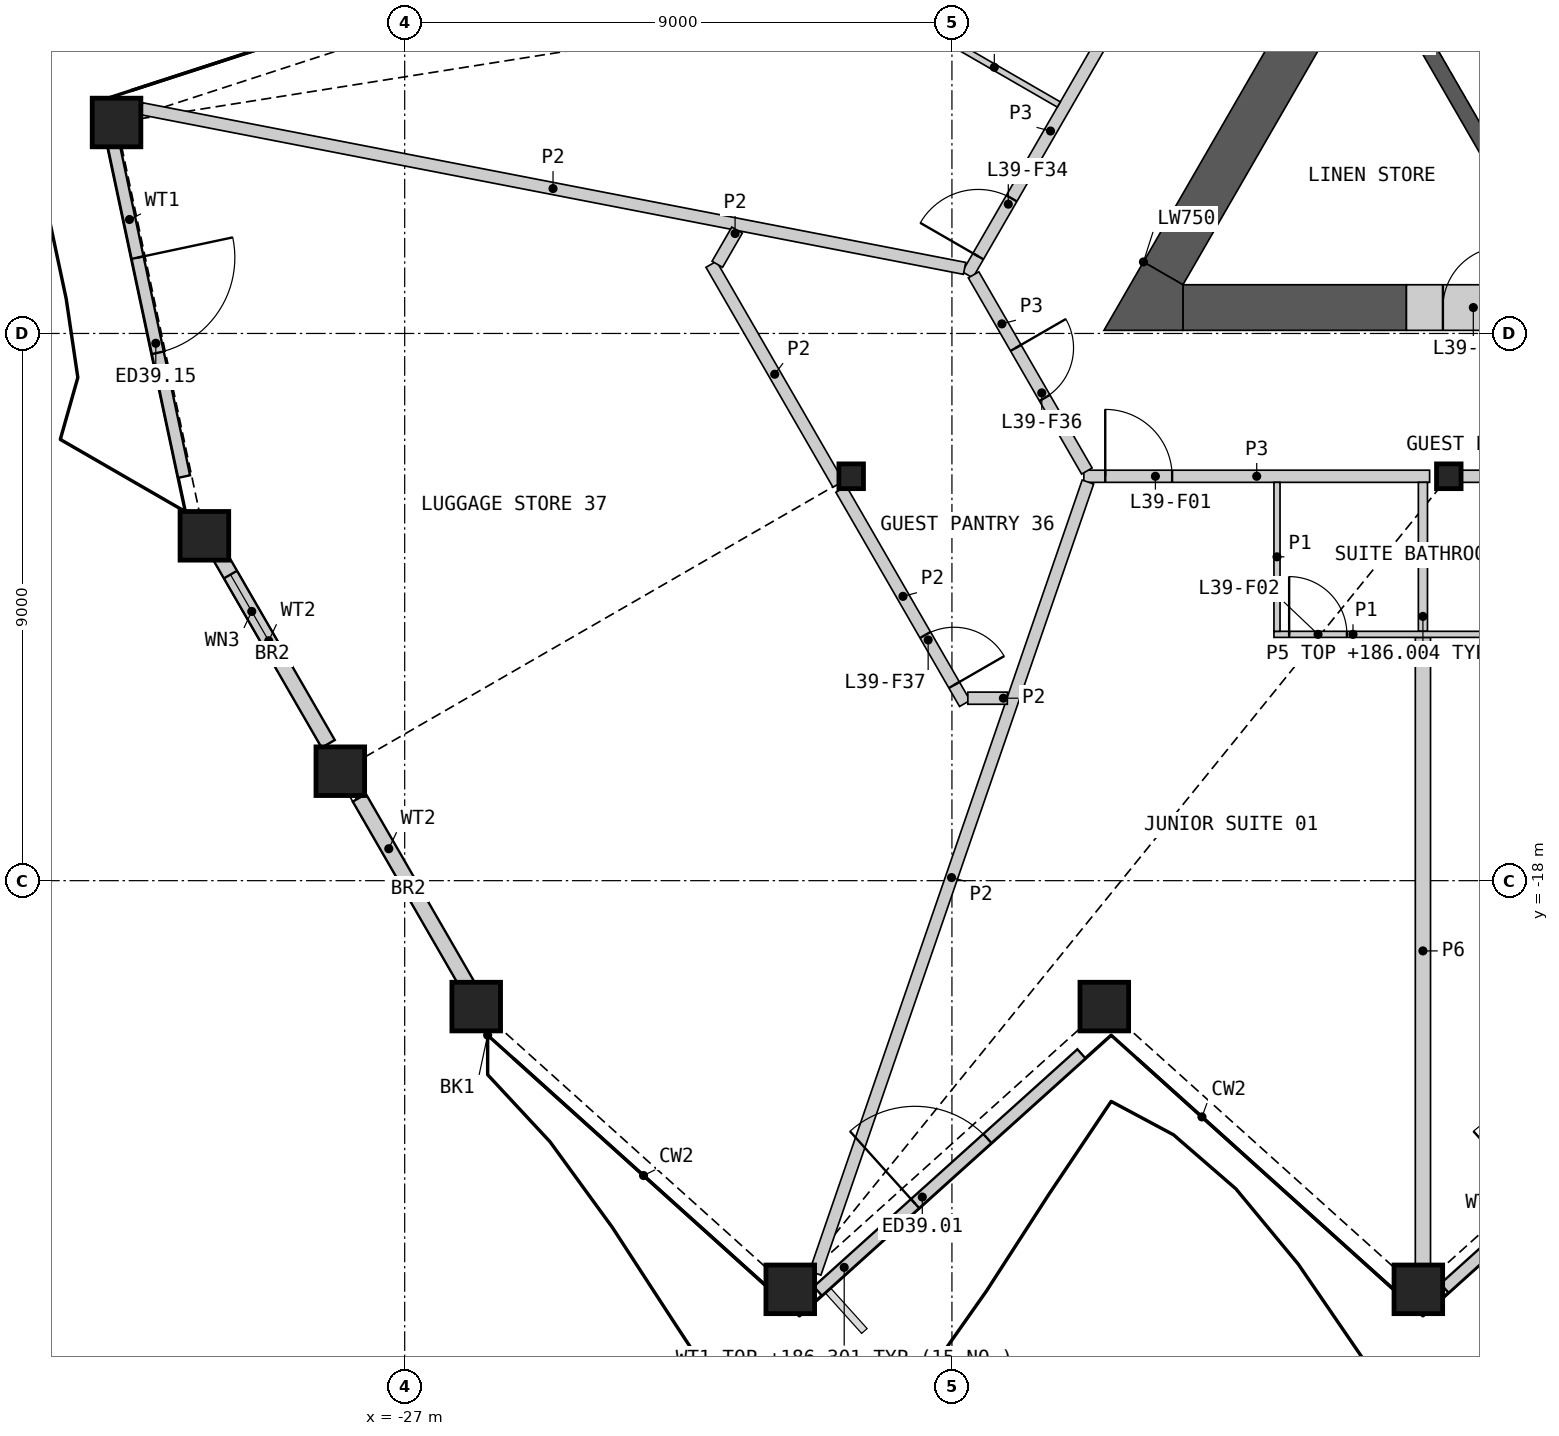
"""IFC4 building model, lengths in metres.
Left out: names, types, materials, properties, quantities, classifications, styles, units other than length and angle.
Written with IfcOpenShell. Run it as: python <this file> out.ifc"""

import sys

from ifc_helpers import new_model, si_unit, direction, frame, frame_2d, origin, origin_2d, place, context, subcontext, project, spatial, polyline, rectangle, hollow_rectangle, i_section, outline, extrude, element, fill, save


model = new_model("IFC4")
c1 = context("Model", 3, precision=1e-05, world=origin(), true_north=direction((0.0, 1.0)))
c2 = subcontext(c1, "Body", "Model", "MODEL_VIEW")
j1 = project(units=[si_unit("LENGTHUNIT", "METRE"), si_unit("PLANEANGLEUNIT", "RADIAN")], contexts=[c1])
p1 = place(None, origin())
s1 = spatial("IfcSite", under=j1, at=p1, CompositionType="ELEMENT")
p2 = place(p1, origin())
s2 = spatial("IfcBuilding", under=s1, at=p2, CompositionType="ELEMENT")
p3 = place(p2, frame((0.0, 0.0, 183.6)))
s3 = spatial("IfcBuildingStorey", under=s2, at=p3, CompositionType="ELEMENT", Elevation=183.6)
for number, where, z_axis, x_axis in (
    (1, (-25.823, -20.071, 0.0), (0.0, 0.0, 1.0), (1.0, 0.0, 0.0)),
    (2, (-20.659, -24.722, 0.0), (0.0, 0.0, 1.0), (1.0, 0.0, 0.0)),
    (3, (-15.494, -20.071, 0.0), (0.0, 0.0, 1.0), (1.0, 0.0, 0.0)),
    (4, (-10.329, -24.722, 0.0), (0.0, 0.0, 1.0), (1.0, 0.0, 0.0)),
    (5, (-31.739, -5.53, 0.0), (0.0, 0.0, 1.0), (1.0, 0.0, 0.0)),
    (6, (-30.294, -12.328, 0.0), (0.0, 0.0, 1.0), (1.0, 0.0, 0.0)),
    (7, (-28.059, -16.2, 0.0), (0.0, 0.0, 1.0), (1.0, 0.0, 0.0)),
):
    element("IfcColumn", number, at=place(p3, frame(where, z_axis=z_axis, x_axis=x_axis)), inside=s3, PredefinedType="COLUMN", context=c2, shape_type="SweptSolid", body=[
        extrude(hollow_rectangle(XDim=0.8, YDim=0.8, WallThickness=0.05, at=origin_2d()), origin(), (0.0, 0.0, 1.0), 3.6),
    ])
for number, where, z_axis, x_axis in (
    (8, (-19.657, -11.349, 0.0), (0.0, 0.0, 1.0), (1.0, 0.0, 0.0)),
    (9, (-9.828, -11.349, 0.0), (0.0, 0.0, 1.0), (1.0, 0.0, 0.0)),
):
    element("IfcColumn", number, at=place(p3, frame(where, z_axis=z_axis, x_axis=x_axis)), inside=s3, PredefinedType="COLUMN", context=c2, shape_type="SweptSolid", body=[
        extrude(i_section(OverallWidth=0.404, OverallDepth=0.407, WebThickness=0.027, FlangeThickness=0.044, at=origin_2d()), origin(), (0.0, 0.0, 1.0), 3.6),
    ])
p4 = place(p3, frame((-20.205, -24.751, 0.0), z_axis=(0.0, 0.0, 1.0), x_axis=(0.743135964011, 0.669140447883, 0.0)))
e10 = element("IfcWall", 10, at=p4, inside=s3, PredefinedType="SOLIDWALL", context=c2, shape_type="SweptSolid", body=[
    extrude(rectangle(XDim=5.833, YDim=0.2, at=frame_2d((2.917, 0.0))), origin(), (0.0, 0.0, 1.0), 2.701),
])
p5 = place(p4, frame((2.152, 0.0, 0.0)))
e11 = element("IfcOpeningElement", 11, at=p5, cuts=e10, PredefinedType="OPENING", context=c2, shape_type="SweptSolid", body=[
    extrude(rectangle(XDim=1.6, YDim=2.4, at=frame_2d((0.8, 1.2))), frame((0.0, 0.11, 0.0), z_axis=(0.0, -1.0, 0.0), x_axis=(1.0, 0.0, 0.0)), (0.0, 0.0, 1.0), 0.22),
])
p6 = place(p3, frame((-9.899, -24.704, 0.0), z_axis=(0.0, 0.0, 1.0), x_axis=(0.74312139518, 0.669156627424, 0.0)))
e12 = element("IfcWall", 12, at=p6, inside=s3, PredefinedType="SOLIDWALL", context=c2, shape_type="SweptSolid", body=[
    extrude(rectangle(XDim=5.763, YDim=0.2, at=frame_2d((2.882, 0.0))), origin(), (0.0, 0.0, 1.0), 2.701),
])
p7 = place(p6, frame((2.082, 0.0, 0.0)))
e13 = element("IfcOpeningElement", 13, at=p7, cuts=e12, PredefinedType="OPENING", context=c2, shape_type="SweptSolid", body=[
    extrude(rectangle(XDim=1.6, YDim=2.4, at=frame_2d((0.8, 1.2))), frame((0.0, 0.11, 0.0), z_axis=(0.0, -1.0, 0.0), x_axis=(1.0, 0.0, 0.0)), (0.0, 0.0, 1.0), 0.22),
])
p8 = place(p3, frame((-31.826, -5.717, 0.0), z_axis=(0.0, 0.0, 1.0), x_axis=(0.207914487103, -0.978147006361, 0.0)))
e14 = element("IfcWall", 14, at=p8, inside=s3, PredefinedType="SOLIDWALL", context=c2, shape_type="SweptSolid", body=[
    extrude(rectangle(XDim=5.763, YDim=0.2, at=frame_2d((2.882, 0.0))), origin(), (0.0, 0.0, 1.0), 2.701),
])
p9 = place(p8, frame((2.082, 0.0, 0.0)))
e15 = element("IfcOpeningElement", 15, at=p9, cuts=e14, PredefinedType="OPENING", context=c2, shape_type="SweptSolid", body=[
    extrude(rectangle(XDim=1.6, YDim=2.4, at=frame_2d((0.8, 1.2))), frame((0.0, 0.11, 0.0), z_axis=(0.0, -1.0, 0.0), x_axis=(1.0, 0.0, 0.0)), (0.0, 0.0, 1.0), 0.22),
])
p10 = place(p3, frame((-30.215, -12.36, 0.0), z_axis=(0.0, 0.0, 1.0), x_axis=(0.499995984904, -0.866027721889, 0.0)))
e16 = element("IfcWall", 16, at=p10, inside=s3, PredefinedType="SOLIDWALL", context=c2, shape_type="SweptSolid", body=[
    extrude(rectangle(XDim=3.915, YDim=0.25, at=frame_2d((1.957, 0.0))), origin(), (0.0, 0.0, 1.0), 2.701),
])
p11 = place(p10, frame((0.7, 0.0, 1.7)))
e17 = element("IfcOpeningElement", 17, at=p11, cuts=e16, PredefinedType="OPENING", context=c2, shape_type="SweptSolid", body=[
    extrude(rectangle(XDim=1.4, YDim=0.8, at=frame_2d((0.7, 0.4))), frame((0.0, 0.135, 0.0), z_axis=(0.0, -1.0, 0.0), x_axis=(1.0, 0.0, 0.0)), (0.0, 0.0, 1.0), 0.27),
])
p12 = place(p3, frame((-27.745, -16.637, 0.0), z_axis=(0.0, 0.0, 1.0), x_axis=(0.499981047344, -0.866036345829, 0.0)))
e18 = element("IfcWall", 18, at=p12, inside=s3, PredefinedType="SOLIDWALL", context=c2, shape_type="SweptSolid", body=[
    extrude(rectangle(XDim=3.868, YDim=0.25, at=frame_2d((1.934, 0.0))), origin(), (0.0, 0.0, 1.0), 2.701),
])
p13 = place(p3, origin())
e19 = element("IfcWall", 19, at=p13, inside=s3, PredefinedType="SHEAR", context=c2, shape_type="SweptSolid", body=[
    extrude(outline(polyline([(-10.374, -4.206), (-8.83, -6.881), (-8.738, -6.539), (-10.032, -4.298), (-10.374, -4.206)])), origin(), (0.0, 0.0, 1.0), 3.25),
])
p14 = place(p3, frame((-14.201, -8.574, 0.0), z_axis=(0.0, 0.0, 1.0), x_axis=(1.0, 0.0, 0.0)))
e20 = element("IfcWall", 20, at=p14, inside=s3, PredefinedType="SHEAR", context=c2, shape_type="SweptSolid", body=[
    extrude(rectangle(XDim=3.676, YDim=0.75, at=frame_2d((1.838, 0.0))), origin(), (0.0, 0.0, 1.0), 3.25),
])
p15 = place(p3, frame((-9.625, 0.477, 0.0), z_axis=(0.0, 0.0, 1.0), x_axis=(-0.499986234705, -0.866033351035, 0.0)))
e21 = element("IfcWall", 21, at=p15, inside=s3, PredefinedType="SHEAR", context=c2, shape_type="SweptSolid", body=[
    extrude(rectangle(XDim=9.801, YDim=0.75, at=frame_2d((4.9, 0.0))), origin(), (0.0, 0.0, 1.0), 3.25),
])
p16 = place(p3, origin())
e22 = element("IfcWall", 22, at=p16, inside=s3, PredefinedType="SHEAR", context=c2, shape_type="SweptSolid", body=[
    extrude(outline(polyline([(-14.851, -7.824), (-14.201, -8.199), (-14.201, -8.949), (-15.5, -8.949), (-14.851, -7.824)])), origin(), (0.0, 0.0, 1.0), 3.25),
])
p17 = place(p3, frame((-10.525, -8.574, 0.0), z_axis=(0.0, 0.0, 1.0), x_axis=(1.0, 0.0, 0.0)))
e23 = element("IfcWall", 23, at=p17, inside=s3, PredefinedType="SHEAR", context=c2, shape_type="SweptSolid", body=[
    extrude(rectangle(XDim=2.2, YDim=0.75, at=frame_2d((1.1, 0.0))), origin(), (0.0, 0.0, 1.0), 3.25),
])
p18 = place(p17, frame((0.6, 0.0, 0.0)))
e24 = element("IfcOpeningElement", 24, at=p18, cuts=e23, PredefinedType="OPENING", context=c2, shape_type="SweptSolid", body=[
    extrude(rectangle(XDim=1.0, YDim=2.1, at=frame_2d((0.5, 1.05))), frame((0.0, 0.385, 0.0), z_axis=(0.0, -1.0, 0.0), x_axis=(1.0, 0.0, 0.0)), (0.0, 0.0, 1.0), 0.77),
])
p19 = place(p3, frame((-10.254, -24.312, 0.0), z_axis=(0.0, 0.0, 1.0), x_axis=(0.0, 1.0, 0.0)))
e25 = element("IfcWall", 25, at=p19, inside=s3, PredefinedType="PARTITIONING", context=c2, shape_type="SweptSolid", body=[
    extrude(rectangle(XDim=10.313, YDim=0.25, at=frame_2d((5.156, 0.0))), origin(), (0.0, 0.0, 1.0), 2.404),
])
p20 = place(p3, frame((-9.615, -11.349, 0.0), z_axis=(0.0, 0.0, 1.0), x_axis=(1.0, 0.0, 0.0)))
e26 = element("IfcWall", 26, at=p20, inside=s3, PredefinedType="PARTITIONING", context=c2, shape_type="SweptSolid", body=[
    extrude(rectangle(XDim=9.401, YDim=0.2, at=frame_2d((4.701, 0.0))), origin(), (0.0, 0.0, 1.0), 3.25),
])
p21 = place(p20, frame((3.15, 0.0, 0.0)))
e27 = element("IfcOpeningElement", 27, at=p21, cuts=e26, PredefinedType="OPENING", context=c2, shape_type="SweptSolid", body=[
    extrude(rectangle(XDim=1.0, YDim=2.1, at=frame_2d((0.5, 1.05))), frame((0.0, 0.11, 0.0), z_axis=(0.0, -1.0, 0.0), x_axis=(1.0, 0.0, 0.0)), (0.0, 0.0, 1.0), 0.22),
])
p22 = place(p20, frame((4.851, 0.0, 0.0)))
e28 = element("IfcOpeningElement", 28, at=p22, cuts=e26, PredefinedType="OPENING", context=c2, shape_type="SweptSolid", body=[
    extrude(rectangle(XDim=1.0, YDim=2.1, at=frame_2d((0.5, 1.05))), frame((0.0, 0.11, 0.0), z_axis=(0.0, -1.0, 0.0), x_axis=(1.0, 0.0, 0.0)), (0.0, 0.0, 1.0), 0.22),
])
p23 = place(p3, frame((-15.831, -11.349, 0.0), z_axis=(0.0, 0.0, 1.0), x_axis=(1.0, 0.0, 0.0)))
e29 = element("IfcWall", 29, at=p23, inside=s3, PredefinedType="PARTITIONING", context=c2, shape_type="SweptSolid", body=[
    extrude(rectangle(XDim=5.687, YDim=0.2, at=frame_2d((2.843, 0.0))), origin(), (0.0, 0.0, 1.0), 3.25),
])
p24 = place(p23, frame((0.352, 0.0, 0.0)))
e30 = element("IfcOpeningElement", 30, at=p24, cuts=e29, PredefinedType="OPENING", context=c2, shape_type="SweptSolid", body=[
    extrude(rectangle(XDim=1.1, YDim=2.1, at=frame_2d((0.55, 1.05))), frame((0.0, 0.11, 0.0), z_axis=(0.0, -1.0, 0.0), x_axis=(1.0, 0.0, 0.0)), (0.0, 0.0, 1.0), 0.22),
])
p25 = place(p3, frame((-17.744, -8.035, 0.0), z_axis=(0.0, 0.0, 1.0), x_axis=(0.49998041698, 0.866036709751, 0.0)))
e31 = element("IfcWall", 31, at=p25, inside=s3, PredefinedType="PARTITIONING", context=c2, shape_type="SweptSolid", body=[
    extrude(rectangle(XDim=5.462, YDim=0.2, at=frame_2d((2.731, 0.0))), origin(), (0.0, 0.0, 1.0), 3.25),
])
p26 = place(p25, frame((0.352, 0.0, 0.0)))
e32 = element("IfcOpeningElement", 32, at=p26, cuts=e31, PredefinedType="OPENING", context=c2, shape_type="SweptSolid", body=[
    extrude(rectangle(XDim=1.1, YDim=2.1, at=frame_2d((0.55, 1.05))), frame((0.0, 0.11, 0.0), z_axis=(0.0, -1.0, 0.0), x_axis=(1.0, 0.0, 0.0)), (0.0, 0.0, 1.0), 0.22),
])
p27 = place(p3, frame((-17.644, -8.035, 0.0), z_axis=(0.0, 0.0, 1.0), x_axis=(0.499958791762, -0.866049194065, 0.0)))
e33 = element("IfcWall", 33, at=p27, inside=s3, PredefinedType="PARTITIONING", context=c2, shape_type="SweptSolid", body=[
    extrude(rectangle(XDim=3.726, YDim=0.2, at=frame_2d((1.863, 0.0))), origin(), (0.0, 0.0, 1.0), 3.25),
])
p28 = place(p27, frame((1.388, 0.0, 0.0)))
e34 = element("IfcOpeningElement", 34, at=p28, cuts=e33, PredefinedType="OPENING", context=c2, shape_type="SweptSolid", body=[
    extrude(rectangle(XDim=0.95, YDim=2.1, at=frame_2d((0.475, 1.05))), frame((0.0, 0.11, 0.0), z_axis=(0.0, -1.0, 0.0), x_axis=(1.0, 0.0, 0.0)), (0.0, 0.0, 1.0), 0.22),
])
p29 = place(p3, frame((-31.329, -5.303, 0.0), z_axis=(0.0, 0.0, 1.0), x_axis=(0.981696755608, -0.190450728612, 0.0)))
e35 = element("IfcWall", 35, at=p29, inside=s3, PredefinedType="PARTITIONING", context=c2, shape_type="SweptSolid", body=[
    extrude(rectangle(XDim=13.79, YDim=0.2, at=frame_2d((6.895, 0.0))), origin(), (0.0, 0.0, 1.0), 2.404),
])
p30 = place(p3, frame((-20.249, -24.455, 0.0), z_axis=(0.0, 0.0, 1.0), x_axis=(0.325902118519, 0.945403516571, 0.0)))
e36 = element("IfcWall", 36, at=p30, inside=s3, PredefinedType="PARTITIONING", context=c2, shape_type="SweptSolid", body=[
    extrude(rectangle(XDim=13.763, YDim=0.2, at=frame_2d((6.881, 0.0))), origin(), (0.0, 0.0, 1.0), 2.404),
])
p31 = place(p3, frame((-21.958, -7.862, 0.0), z_axis=(0.0, 0.0, 1.0), x_axis=(0.499987304225, -0.866032733569, 0.0)))
e37 = element("IfcWall", 37, at=p31, inside=s3, PredefinedType="PARTITIONING", context=c2, shape_type="SweptSolid", body=[
    extrude(rectangle(XDim=4.176, YDim=0.2, at=frame_2d((2.088, 0.0))), origin(), (0.0, 0.0, 1.0), 2.404),
])
p32 = place(p3, frame((-19.822, -11.562, 0.0), z_axis=(0.0, 0.0, 1.0), x_axis=(0.499992600721, -0.866029675718, 0.0)))
e38 = element("IfcWall", 38, at=p32, inside=s3, PredefinedType="PARTITIONING", context=c2, shape_type="SweptSolid", body=[
    extrude(rectangle(XDim=4.068, YDim=0.2, at=frame_2d((2.034, 0.0))), origin(), (0.0, 0.0, 1.0), 2.404),
])
p33 = place(p32, frame((2.767, 0.0, 0.0)))
e39 = element("IfcOpeningElement", 39, at=p33, cuts=e38, PredefinedType="OPENING", context=c2, shape_type="SweptSolid", body=[
    extrude(rectangle(XDim=0.95, YDim=2.1, at=frame_2d((0.475, 1.05))), frame((0.0, 0.11, 0.0), z_axis=(0.0, -1.0, 0.0), x_axis=(1.0, 0.0, 0.0)), (0.0, 0.0, 1.0), 0.22),
])
for number, where, z_axis, x_axis in (
    (40, (-21.859, -7.862, 0.0), (0.0, 0.0, 1.0), (0.5, 0.866, 0.0)),
    (41, (-17.738, -14.999, 0.0), (0.0, 0.0, 1.0), (1.0, 0.0, 0.0)),
):
    element("IfcWall", number, at=place(p3, frame(where, z_axis=z_axis, x_axis=x_axis)), inside=s3, PredefinedType="PARTITIONING", context=c2, shape_type="SweptSolid", body=[
        extrude(rectangle(XDim=0.649, YDim=0.2, at=frame_2d((0.325, 0.0))), origin(), (0.0, 0.0, 1.0), 2.404),
    ])
p34 = place(p3, frame((-10.254, -13.899, 0.0), z_axis=(0.0, 0.0, 1.0), x_axis=(0.0, 1.0, 0.0)))
e42 = element("IfcWall", 42, at=p34, inside=s3, PredefinedType="PLUMBINGWALL", context=c2, shape_type="SweptSolid", body=[
    extrude(rectangle(XDim=2.45, YDim=0.15, at=frame_2d((1.225, 0.0))), origin(), (0.0, 0.0, 1.0), 2.404),
])
p35 = place(p3, frame((-12.704, -13.949, 0.0), z_axis=(0.0, 0.0, 1.0), x_axis=(1.0, 0.0, 0.0)))
e43 = element("IfcWall", 43, at=p35, inside=s3, PredefinedType="PARTITIONING", context=c2, shape_type="SweptSolid", body=[
    extrude(rectangle(XDim=5.2, YDim=0.1, at=frame_2d((2.6, 0.0))), origin(), (0.0, 0.0, 1.0), 2.404),
])
p36 = place(p35, frame((0.25, 0.0, 0.0)))
e44 = element("IfcOpeningElement", 44, at=p36, cuts=e43, PredefinedType="OPENING", context=c2, shape_type="SweptSolid", body=[
    extrude(rectangle(XDim=0.95, YDim=2.1, at=frame_2d((0.475, 1.05))), frame((0.0, 0.06, 0.0), z_axis=(0.0, -1.0, 0.0), x_axis=(1.0, 0.0, 0.0)), (0.0, 0.0, 1.0), 0.12),
])
p37 = place(p35, frame((4.0, 0.0, 0.0)))
e45 = element("IfcOpeningElement", 45, at=p37, cuts=e43, PredefinedType="OPENING", context=c2, shape_type="SweptSolid", body=[
    extrude(rectangle(XDim=0.95, YDim=2.1, at=frame_2d((0.475, 1.05))), frame((0.0, 0.06, 0.0), z_axis=(0.0, -1.0, 0.0), x_axis=(1.0, 0.0, 0.0)), (0.0, 0.0, 1.0), 0.12),
])
for number, where, z_axis, x_axis in (
    (46, (-18.364, -4.01, 0.0), (0.0, 0.0, 1.0), (0.866, -0.5, 0.0)),
    (47, (-12.654, -13.899, 0.0), (0.0, 0.0, 1.0), (0.0, 1.0, 0.0)),
):
    element("IfcWall", number, at=place(p3, frame(where, z_axis=z_axis, x_axis=x_axis)), inside=s3, PredefinedType="PARTITIONING", context=c2, shape_type="SweptSolid", body=[
        extrude(rectangle(XDim=2.45, YDim=0.1, at=frame_2d((1.225, 0.0))), origin(), (0.0, 0.0, 1.0), 2.404),
    ])
p38 = place(p5, origin())
e48 = element("IfcDoor", 48, at=p38, inside=s3, OperationType="DOUBLE_DOOR_SINGLE_SWING", PredefinedType="DOOR", context=c2, shape_type="SweptSolid", body=[
    extrude(rectangle(XDim=1.6, YDim=2.4, at=frame_2d((0.8, 1.2))), frame((0.0, 0.025, 0.0), z_axis=(0.0, -1.0, 0.0), x_axis=(1.0, 0.0, 0.0)), (0.0, 0.0, 1.0), 0.05),
])
fill(e11, e48)
p39 = place(p9, origin())
e49 = element("IfcDoor", 49, at=p39, inside=s3, OperationType="DOUBLE_DOOR_SINGLE_SWING", PredefinedType="DOOR", context=c2, shape_type="SweptSolid", body=[
    extrude(rectangle(XDim=1.6, YDim=2.4, at=frame_2d((0.8, 1.2))), frame((0.0, 0.025, 0.0), z_axis=(0.0, -1.0, 0.0), x_axis=(1.0, 0.0, 0.0)), (0.0, 0.0, 1.0), 0.05),
])
fill(e15, e49)
p40 = place(p11, origin())
e50 = element("IfcWindow", 50, at=p40, inside=s3, PartitioningType="SINGLE_PANEL", PredefinedType="WINDOW", context=c2, shape_type="SweptSolid", body=[
    extrude(rectangle(XDim=1.4, YDim=0.8, at=frame_2d((0.7, 0.4))), frame((0.0, 0.03, 0.0), z_axis=(0.0, -1.0, 0.0), x_axis=(1.0, 0.0, 0.0)), (0.0, 0.0, 1.0), 0.06),
])
fill(e17, e50)
p41 = place(p18, origin())
e51 = element("IfcDoor", 51, at=p41, inside=s3, OperationType="SINGLE_SWING_RIGHT", PredefinedType="DOOR", context=c2, shape_type="SweptSolid", body=[
    extrude(rectangle(XDim=1.0, YDim=2.1, at=frame_2d((0.5, 1.05))), frame((0.0, 0.13, 0.0), z_axis=(0.0, -1.0, 0.0), x_axis=(1.0, 0.0, 0.0)), (0.0, 0.0, 1.0), 0.05),
])
fill(e24, e51)
p42 = place(p24, origin())
e52 = element("IfcDoor", 52, at=p42, inside=s3, OperationType="SINGLE_SWING_LEFT", PredefinedType="DOOR", context=c2, shape_type="SweptSolid", body=[
    extrude(rectangle(XDim=1.1, YDim=2.1, at=frame_2d((0.55, 1.05))), frame((0.0, 0.025, 0.0), z_axis=(0.0, -1.0, 0.0), x_axis=(1.0, 0.0, 0.0)), (0.0, 0.0, 1.0), 0.05),
])
fill(e30, e52)
p43 = place(p36, origin())
e53 = element("IfcDoor", 53, at=p43, inside=s3, OperationType="SINGLE_SWING_LEFT", PredefinedType="DOOR", context=c2, shape_type="SweptSolid", body=[
    extrude(rectangle(XDim=0.95, YDim=2.1, at=frame_2d((0.475, 1.05))), frame((0.0, 0.025, 0.0), z_axis=(0.0, -1.0, 0.0), x_axis=(1.0, 0.0, 0.0)), (0.0, 0.0, 1.0), 0.05),
])
fill(e44, e53)
p44 = place(p26, origin())
e54 = element("IfcDoor", 54, at=p44, inside=s3, OperationType="SINGLE_SWING_LEFT", PredefinedType="DOOR", context=c2, shape_type="SweptSolid", body=[
    extrude(rectangle(XDim=1.1, YDim=2.1, at=frame_2d((0.55, 1.05))), frame((0.0, 0.025, 0.0), z_axis=(0.0, -1.0, 0.0), x_axis=(1.0, 0.0, 0.0)), (0.0, 0.0, 1.0), 0.05),
])
fill(e32, e54)
p45 = place(p28, origin())
e55 = element("IfcDoor", 55, at=p45, inside=s3, OperationType="SINGLE_SWING_LEFT", PredefinedType="DOOR", context=c2, shape_type="SweptSolid", body=[
    extrude(rectangle(XDim=0.95, YDim=2.1, at=frame_2d((0.475, 1.05))), frame((0.0, 0.025, 0.0), z_axis=(0.0, -1.0, 0.0), x_axis=(1.0, 0.0, 0.0)), (0.0, 0.0, 1.0), 0.05),
])
fill(e34, e55)
p46 = place(p33, origin())
e56 = element("IfcDoor", 56, at=p46, inside=s3, OperationType="SINGLE_SWING_RIGHT", PredefinedType="DOOR", context=c2, shape_type="SweptSolid", body=[
    extrude(rectangle(XDim=0.95, YDim=2.1, at=frame_2d((0.475, 1.05))), frame((0.0, 0.025, 0.0), z_axis=(0.0, -1.0, 0.0), x_axis=(1.0, 0.0, 0.0)), (0.0, 0.0, 1.0), 0.05),
])
fill(e39, e56)
save(model, sys.argv[1])
